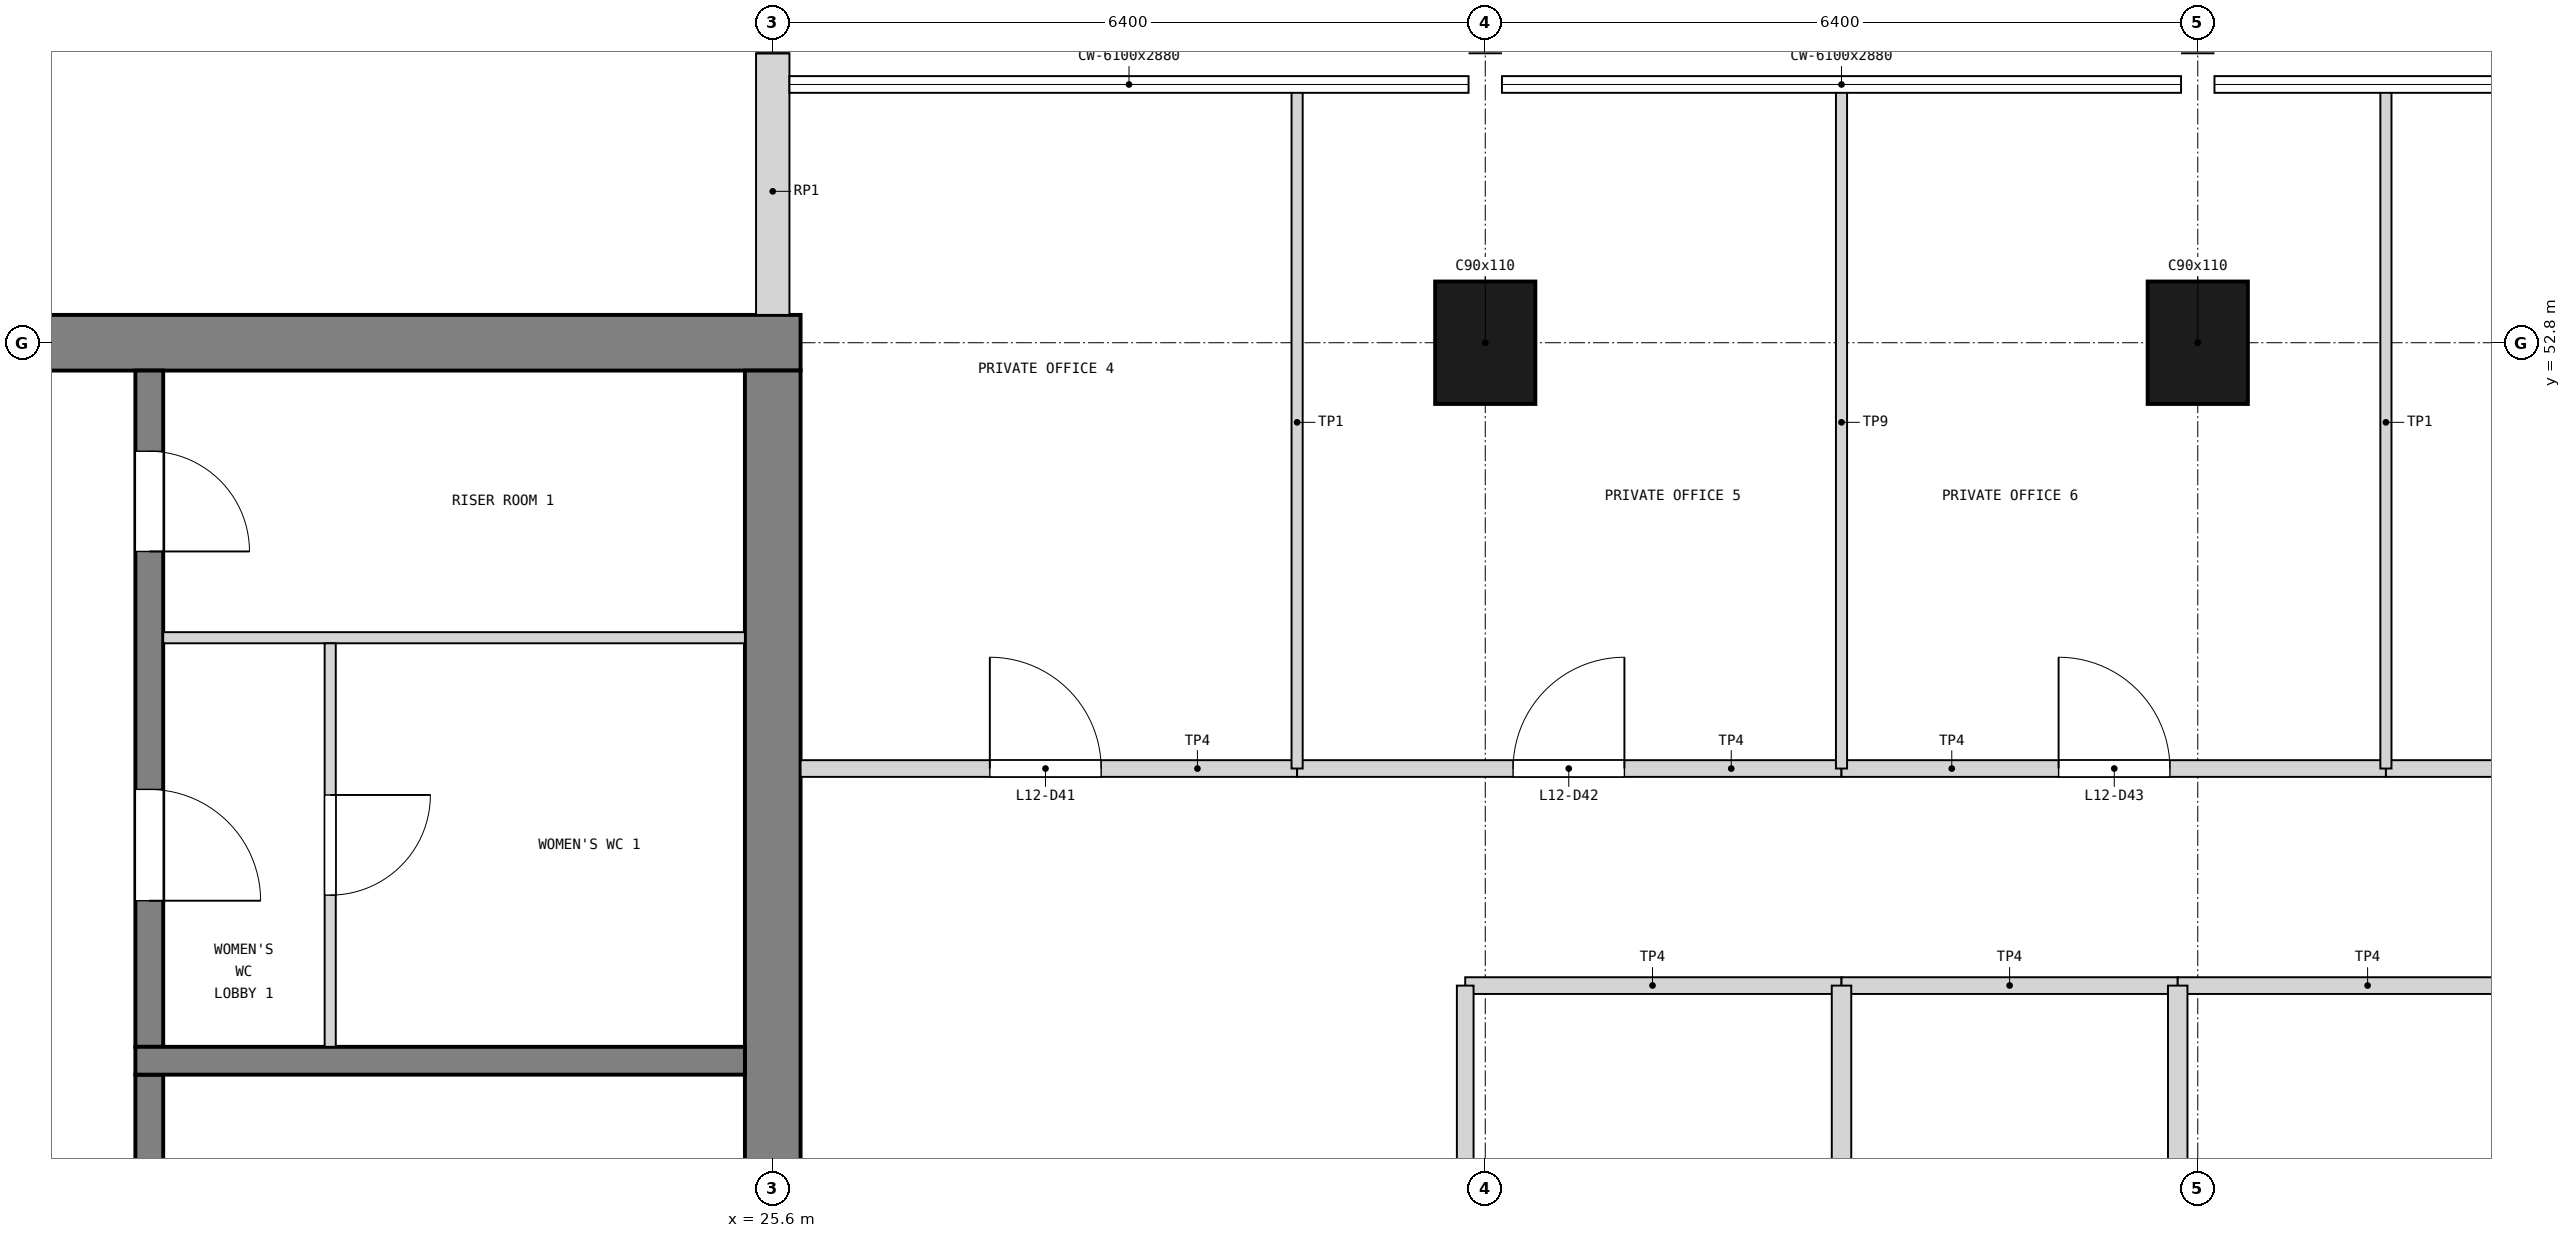
"""IFC4 building model, lengths in metres.
Left out: names, types, materials, properties, quantities, classifications, styles, units other than length and angle.
Written with IfcOpenShell. Run it as: python <this file> out.ifc"""

import sys

from ifc_helpers import new_model, si_unit, direction, frame, frame_2d, origin, origin_2d, place, context, subcontext, project, spatial, rectangle, extrude, element, fill, save


model = new_model("IFC4")
c1 = context("Model", 3, precision=1e-05, world=origin(), true_north=direction((0.0, 1.0)))
c2 = subcontext(c1, "Body", "Model", "MODEL_VIEW")
j1 = project(units=[si_unit("LENGTHUNIT", "METRE"), si_unit("PLANEANGLEUNIT", "RADIAN")], contexts=[c1])
p1 = place(None, origin())
s1 = spatial("IfcSite", under=j1, at=p1, CompositionType="ELEMENT")
p2 = place(p1, origin())
s2 = spatial("IfcBuilding", under=s1, at=p2, CompositionType="ELEMENT")
p3 = place(p2, frame((0.0, 0.0, 48.3)))
s3 = spatial("IfcBuildingStorey", under=s2, at=p3, CompositionType="ELEMENT", Elevation=48.3)
p4 = place(p3, frame((12.55, 52.8, 0.0), z_axis=(0.0, 0.0, 1.0), x_axis=(1.0, 0.0, 0.0)))
e1 = element("IfcWall", 1, at=p4, inside=s3, PredefinedType="SHEAR", context=c2, shape_type="SweptSolid", body=[
    extrude(rectangle(XDim=13.3, YDim=0.5, at=frame_2d((6.65, 0.0))), origin(), (0.0, 0.0, 1.0), 3.9),
])
p5 = place(p4, frame((1.85, 0.0, 1.0)))
e2 = element("IfcOpeningElement", 2, at=p5, cuts=e1, PredefinedType="OPENING", context=c2, shape_type="SweptSolid", body=[
    extrude(rectangle(XDim=0.4, YDim=2.0, at=frame_2d((0.2, 1.0))), frame((0.0, 0.26, 0.0), z_axis=(0.0, -1.0, 0.0), x_axis=(1.0, 0.0, 0.0)), (0.0, 0.0, 1.0), 0.52),
])
p6 = place(p3, frame((25.6, 33.85, 0.0), z_axis=(0.0, 0.0, 1.0), x_axis=(0.0, 1.0, 0.0)))
e3 = element("IfcWall", 3, at=p6, inside=s3, PredefinedType="SHEAR", context=c2, shape_type="SweptSolid", body=[
    extrude(rectangle(XDim=18.7, YDim=0.5, at=frame_2d((9.35, 0.0))), origin(), (0.0, 0.0, 1.0), 3.9),
])
p7 = place(p6, frame((8.35, 0.0, 0.0)))
e4 = element("IfcOpeningElement", 4, at=p7, cuts=e3, PredefinedType="OPENING", context=c2, shape_type="SweptSolid", body=[
    extrude(rectangle(XDim=2.0, YDim=2.1, at=frame_2d((1.0, 1.05))), frame((0.0, 0.26, 0.0), z_axis=(0.0, -1.0, 0.0), x_axis=(1.0, 0.0, 0.0)), (0.0, 0.0, 1.0), 0.52),
])
for number, where, z_axis, x_axis in (
    (5, (32.0, 52.8, 0.0), (0.0, 0.0, 1.0), (1.0, 0.0, 0.0)),
    (6, (38.4, 52.8, 0.0), (0.0, 0.0, 1.0), (1.0, 0.0, 0.0)),
):
    element("IfcColumn", number, at=place(p3, frame(where, z_axis=z_axis, x_axis=x_axis)), inside=s3, PredefinedType="COLUMN", context=c2, shape_type="SweptSolid", body=[
        extrude(rectangle(XDim=0.9, YDim=1.1, at=origin_2d()), origin(), (0.0, 0.0, 1.0), 3.9),
    ])
p8 = place(p3, frame((25.6, 53.05, 0.0), z_axis=(0.0, 0.0, 1.0), x_axis=(0.0, 1.0, 0.0)))
e7 = element("IfcWall", 7, at=p8, inside=s3, PredefinedType="SOLIDWALL", context=c2, shape_type="SweptSolid", body=[
    extrude(rectangle(XDim=2.35, YDim=0.3, at=frame_2d((1.175, 0.0))), origin(), (0.0, 0.0, 1.0), 2.88),
])
p9 = place(p3, frame((20.0, 40.175, 0.0), z_axis=(0.0, 0.0, 1.0), x_axis=(0.0, 1.0, 0.0)))
e8 = element("IfcWall", 8, at=p9, inside=s3, PredefinedType="SOLIDWALL", context=c2, shape_type="SweptSolid", body=[
    extrude(rectangle(XDim=6.05, YDim=0.25, at=frame_2d((3.025, 0.0))), origin(), (0.0, 0.0, 1.0), 3.6),
])
p10 = place(p9, frame((2.025, 0.0, 0.0)))
e9 = element("IfcOpeningElement", 9, at=p10, cuts=e8, PredefinedType="OPENING", context=c2, shape_type="SweptSolid", body=[
    extrude(rectangle(XDim=2.0, YDim=2.1, at=frame_2d((1.0, 1.05))), frame((0.0, 0.135, 0.0), z_axis=(0.0, -1.0, 0.0), x_axis=(1.0, 0.0, 0.0)), (0.0, 0.0, 1.0), 0.27),
])
p11 = place(p3, frame((20.0, 46.475, 0.0), z_axis=(0.0, 0.0, 1.0), x_axis=(0.0, 1.0, 0.0)))
e10 = element("IfcWall", 10, at=p11, inside=s3, PredefinedType="SOLIDWALL", context=c2, shape_type="SweptSolid", body=[
    extrude(rectangle(XDim=6.075, YDim=0.25, at=frame_2d((3.038, 0.0))), origin(), (0.0, 0.0, 1.0), 3.6),
])
p12 = place(p11, frame((1.312, 0.0, 0.0)))
e11 = element("IfcOpeningElement", 11, at=p12, cuts=e10, PredefinedType="OPENING", context=c2, shape_type="SweptSolid", body=[
    extrude(rectangle(XDim=1.0, YDim=2.1, at=frame_2d((0.5, 1.05))), frame((0.0, 0.135, 0.0), z_axis=(0.0, -1.0, 0.0), x_axis=(1.0, 0.0, 0.0)), (0.0, 0.0, 1.0), 0.27),
])
p13 = place(p11, frame((4.45, 0.0, 0.0)))
e12 = element("IfcOpeningElement", 12, at=p13, cuts=e10, PredefinedType="OPENING", context=c2, shape_type="SweptSolid", body=[
    extrude(rectangle(XDim=0.9, YDim=2.1, at=frame_2d((0.45, 1.05))), frame((0.0, 0.135, 0.0), z_axis=(0.0, -1.0, 0.0), x_axis=(1.0, 0.0, 0.0)), (0.0, 0.0, 1.0), 0.27),
])
p14 = place(p3, frame((19.875, 46.35, 0.0), z_axis=(0.0, 0.0, 1.0), x_axis=(1.0, 0.0, 0.0)))
e13 = element("IfcWall", 13, at=p14, inside=s3, PredefinedType="SOLIDWALL", context=c2, shape_type="SweptSolid", body=[
    extrude(rectangle(XDim=5.475, YDim=0.25, at=frame_2d((2.738, 0.0))), origin(), (0.0, 0.0, 1.0), 3.6),
])
p15 = place(p3, frame((20.125, 50.15, 0.0), z_axis=(0.0, 0.0, 1.0), x_axis=(1.0, 0.0, 0.0)))
e14 = element("IfcWall", 14, at=p15, inside=s3, PredefinedType="PARTITIONING", context=c2, shape_type="SweptSolid", body=[
    extrude(rectangle(XDim=5.225, YDim=0.1, at=frame_2d((2.613, 0.0))), origin(), (0.0, 0.0, 1.0), 3.6),
])
p16 = place(p3, frame((21.625, 46.475, 0.0), z_axis=(0.0, 0.0, 1.0), x_axis=(0.0, 1.0, 0.0)))
e15 = element("IfcWall", 15, at=p16, inside=s3, PredefinedType="PARTITIONING", context=c2, shape_type="SweptSolid", body=[
    extrude(rectangle(XDim=3.625, YDim=0.1, at=frame_2d((1.812, 0.0))), origin(), (0.0, 0.0, 1.0), 3.6),
])
p17 = place(p16, frame((1.363, 0.0, 0.0)))
e16 = element("IfcOpeningElement", 16, at=p17, cuts=e15, PredefinedType="OPENING", context=c2, shape_type="SweptSolid", body=[
    extrude(rectangle(XDim=0.9, YDim=2.1, at=frame_2d((0.45, 1.05))), frame((0.0, 0.06, 0.0), z_axis=(0.0, -1.0, 0.0), x_axis=(1.0, 0.0, 0.0)), (0.0, 0.0, 1.0), 0.12),
])
p18 = place(p3, frame((31.82, 47.025, 0.0), z_axis=(0.0, 0.0, 1.0), x_axis=(1.0, 0.0, 0.0)))
e17 = element("IfcWall", 17, at=p18, inside=s3, PredefinedType="PARTITIONING", context=c2, shape_type="SweptSolid", body=[
    extrude(rectangle(XDim=3.38, YDim=0.15, at=frame_2d((1.69, 0.0))), origin(), (0.0, 0.0, 1.0), 3.68),
])
p19 = place(p3, frame((35.2, 47.025, 0.0), z_axis=(0.0, 0.0, 1.0), x_axis=(1.0, 0.0, 0.0)))
e18 = element("IfcWall", 18, at=p19, inside=s3, PredefinedType="PARTITIONING", context=c2, shape_type="SweptSolid", body=[
    extrude(rectangle(XDim=3.02, YDim=0.15, at=frame_2d((1.51, 0.0))), origin(), (0.0, 0.0, 1.0), 3.68),
])
p20 = place(p3, frame((38.22, 47.025, 0.0), z_axis=(0.0, 0.0, 1.0), x_axis=(1.0, 0.0, 0.0)))
e19 = element("IfcWall", 19, at=p20, inside=s3, PredefinedType="PARTITIONING", context=c2, shape_type="SweptSolid", body=[
    extrude(rectangle(XDim=3.38, YDim=0.15, at=frame_2d((1.69, 0.0))), origin(), (0.0, 0.0, 1.0), 3.68),
])
p21 = place(p3, frame((35.2, 39.375, 0.0), z_axis=(0.0, 0.0, 1.0), x_axis=(0.0, 1.0, 0.0)))
e20 = element("IfcWall", 20, at=p21, inside=s3, PredefinedType="PARTITIONING", context=c2, shape_type="SweptSolid", body=[
    extrude(rectangle(XDim=7.65, YDim=0.175, at=frame_2d((3.825, 0.0))), origin(), (0.0, 0.0, 1.0), 3.08),
])
p22 = place(p3, frame((38.22, 43.592, 0.0), z_axis=(0.0, 0.0, 1.0), x_axis=(0.0, 1.0, 0.0)))
e21 = element("IfcWall", 21, at=p22, inside=s3, PredefinedType="PARTITIONING", context=c2, shape_type="SweptSolid", body=[
    extrude(rectangle(XDim=3.433, YDim=0.175, at=frame_2d((1.716, 0.0))), origin(), (0.0, 0.0, 1.0), 2.78),
])
p23 = place(p3, frame((25.85, 48.975, 0.0), z_axis=(0.0, 0.0, 1.0), x_axis=(1.0, 0.0, 0.0)))
e22 = element("IfcWall", 22, at=p23, inside=s3, PredefinedType="PARTITIONING", context=c2, shape_type="SweptSolid", body=[
    extrude(rectangle(XDim=4.46, YDim=0.15, at=frame_2d((2.23, 0.0))), origin(), (0.0, 0.0, 1.0), 3.68),
])
p24 = place(p23, frame((1.7, 0.0, 0.0)))
e23 = element("IfcOpeningElement", 23, at=p24, cuts=e22, PredefinedType="OPENING", context=c2, shape_type="SweptSolid", body=[
    extrude(rectangle(XDim=1.0, YDim=2.1, at=frame_2d((0.5, 1.05))), frame((0.0, 0.085, 0.0), z_axis=(0.0, -1.0, 0.0), x_axis=(1.0, 0.0, 0.0)), (0.0, 0.0, 1.0), 0.17),
])
p25 = place(p3, frame((30.31, 48.975, 0.0), z_axis=(0.0, 0.0, 1.0), x_axis=(1.0, 0.0, 0.0)))
e24 = element("IfcWall", 24, at=p25, inside=s3, PredefinedType="PARTITIONING", context=c2, shape_type="SweptSolid", body=[
    extrude(rectangle(XDim=4.89, YDim=0.15, at=frame_2d((2.445, 0.0))), origin(), (0.0, 0.0, 1.0), 3.68),
])
p26 = place(p25, frame((1.94, 0.0, 0.0)))
e25 = element("IfcOpeningElement", 25, at=p26, cuts=e24, PredefinedType="OPENING", context=c2, shape_type="SweptSolid", body=[
    extrude(rectangle(XDim=1.0, YDim=2.1, at=frame_2d((0.5, 1.05))), frame((0.0, 0.085, 0.0), z_axis=(0.0, -1.0, 0.0), x_axis=(1.0, 0.0, 0.0)), (0.0, 0.0, 1.0), 0.17),
])
p27 = place(p3, frame((35.2, 48.975, 0.0), z_axis=(0.0, 0.0, 1.0), x_axis=(1.0, 0.0, 0.0)))
e26 = element("IfcWall", 26, at=p27, inside=s3, PredefinedType="PARTITIONING", context=c2, shape_type="SweptSolid", body=[
    extrude(rectangle(XDim=4.89, YDim=0.15, at=frame_2d((2.445, 0.0))), origin(), (0.0, 0.0, 1.0), 3.68),
])
p28 = place(p27, frame((1.95, 0.0, 0.0)))
e27 = element("IfcOpeningElement", 27, at=p28, cuts=e26, PredefinedType="OPENING", context=c2, shape_type="SweptSolid", body=[
    extrude(rectangle(XDim=1.0, YDim=2.1, at=frame_2d((0.5, 1.05))), frame((0.0, 0.085, 0.0), z_axis=(0.0, -1.0, 0.0), x_axis=(1.0, 0.0, 0.0)), (0.0, 0.0, 1.0), 0.17),
])
p29 = place(p3, frame((40.09, 48.975, 0.0), z_axis=(0.0, 0.0, 1.0), x_axis=(1.0, 0.0, 0.0)))
e28 = element("IfcWall", 28, at=p29, inside=s3, PredefinedType="PARTITIONING", context=c2, shape_type="SweptSolid", body=[
    extrude(rectangle(XDim=4.53, YDim=0.15, at=frame_2d((2.265, 0.0))), origin(), (0.0, 0.0, 1.0), 3.68),
])
p30 = place(p29, frame((1.76, 0.0, 0.0)))
e29 = element("IfcOpeningElement", 29, at=p30, cuts=e28, PredefinedType="OPENING", context=c2, shape_type="SweptSolid", body=[
    extrude(rectangle(XDim=1.0, YDim=2.1, at=frame_2d((0.5, 1.05))), frame((0.0, 0.085, 0.0), z_axis=(0.0, -1.0, 0.0), x_axis=(1.0, 0.0, 0.0)), (0.0, 0.0, 1.0), 0.17),
])
p31 = place(p3, frame((30.31, 48.975, 0.0), z_axis=(0.0, 0.0, 1.0), x_axis=(0.0, 1.0, 0.0)))
e30 = element("IfcWall", 30, at=p31, inside=s3, PredefinedType="PARTITIONING", context=c2, shape_type="SweptSolid", body=[
    extrude(rectangle(XDim=6.125, YDim=0.1, at=frame_2d((3.062, 0.0))), origin(), (0.0, 0.0, 1.0), 3.68),
])
p32 = place(p3, frame((35.2, 48.975, 0.0), z_axis=(0.0, 0.0, 1.0), x_axis=(0.0, 1.0, 0.0)))
e31 = element("IfcWall", 31, at=p32, inside=s3, PredefinedType="PARTITIONING", context=c2, shape_type="SweptSolid", body=[
    extrude(rectangle(XDim=6.125, YDim=0.1, at=frame_2d((3.062, 0.0))), origin(), (0.0, 0.0, 1.0), 3.08),
])
p33 = place(p3, frame((40.09, 48.975, 0.0), z_axis=(0.0, 0.0, 1.0), x_axis=(0.0, 1.0, 0.0)))
e32 = element("IfcWall", 32, at=p33, inside=s3, PredefinedType="PARTITIONING", context=c2, shape_type="SweptSolid", body=[
    extrude(rectangle(XDim=6.125, YDim=0.1, at=frame_2d((3.062, 0.0))), origin(), (0.0, 0.0, 1.0), 3.68),
])
p34 = place(p3, frame((31.82, 43.592, 0.0), z_axis=(0.0, 0.0, 1.0), x_axis=(0.0, 1.0, 0.0)))
e33 = element("IfcWall", 33, at=p34, inside=s3, PredefinedType="PARTITIONING", context=c2, shape_type="SweptSolid", body=[
    extrude(rectangle(XDim=3.433, YDim=0.15, at=frame_2d((1.716, 0.0))), origin(), (0.0, 0.0, 1.0), 2.78),
])
p35 = place(p12, frame((1.0, 0.0, 0.0), z_axis=(0.0, 0.0, 1.0), x_axis=(-1.0, 0.0, 0.0)))
e34 = element("IfcDoor", 34, at=p35, inside=s3, OperationType="SINGLE_SWING_RIGHT", PredefinedType="DOOR", context=c2, shape_type="SweptSolid", body=[
    extrude(rectangle(XDim=1.0, YDim=2.1, at=frame_2d((0.5, 1.05))), frame((0.0, 0.025, 0.0), z_axis=(0.0, -1.0, 0.0), x_axis=(1.0, 0.0, 0.0)), (0.0, 0.0, 1.0), 0.05),
])
fill(e11, e34)
p36 = place(p17, frame((0.9, 0.0, 0.0), z_axis=(0.0, 0.0, 1.0), x_axis=(-1.0, 0.0, 0.0)))
e35 = element("IfcDoor", 35, at=p36, inside=s3, OperationType="SINGLE_SWING_LEFT", PredefinedType="DOOR", context=c2, shape_type="SweptSolid", body=[
    extrude(rectangle(XDim=0.9, YDim=2.1, at=frame_2d((0.45, 1.05))), frame((0.0, 0.025, 0.0), z_axis=(0.0, -1.0, 0.0), x_axis=(1.0, 0.0, 0.0)), (0.0, 0.0, 1.0), 0.05),
])
fill(e16, e35)
p37 = place(p13, frame((0.9, 0.0, 0.0), z_axis=(0.0, 0.0, 1.0), x_axis=(-1.0, 0.0, 0.0)))
e36 = element("IfcDoor", 36, at=p37, inside=s3, OperationType="SINGLE_SWING_RIGHT", PredefinedType="DOOR", context=c2, shape_type="SweptSolid", body=[
    extrude(rectangle(XDim=0.9, YDim=2.1, at=frame_2d((0.45, 1.05))), frame((0.0, 0.025, 0.0), z_axis=(0.0, -1.0, 0.0), x_axis=(1.0, 0.0, 0.0)), (0.0, 0.0, 1.0), 0.05),
])
fill(e12, e36)
p38 = place(p24, origin())
e37 = element("IfcDoor", 37, at=p38, inside=s3, OperationType="SINGLE_SWING_LEFT", PredefinedType="DOOR", context=c2, shape_type="SweptSolid", body=[
    extrude(rectangle(XDim=1.0, YDim=2.1, at=frame_2d((0.5, 1.05))), frame((0.0, 0.025, 0.0), z_axis=(0.0, -1.0, 0.0), x_axis=(1.0, 0.0, 0.0)), (0.0, 0.0, 1.0), 0.05),
])
fill(e23, e37)
p39 = place(p26, origin())
e38 = element("IfcDoor", 38, at=p39, inside=s3, OperationType="SINGLE_SWING_RIGHT", PredefinedType="DOOR", context=c2, shape_type="SweptSolid", body=[
    extrude(rectangle(XDim=1.0, YDim=2.1, at=frame_2d((0.5, 1.05))), frame((0.0, 0.025, 0.0), z_axis=(0.0, -1.0, 0.0), x_axis=(1.0, 0.0, 0.0)), (0.0, 0.0, 1.0), 0.05),
])
fill(e25, e38)
p40 = place(p28, origin())
e39 = element("IfcDoor", 39, at=p40, inside=s3, OperationType="SINGLE_SWING_LEFT", PredefinedType="DOOR", context=c2, shape_type="SweptSolid", body=[
    extrude(rectangle(XDim=1.0, YDim=2.1, at=frame_2d((0.5, 1.05))), frame((0.0, 0.025, 0.0), z_axis=(0.0, -1.0, 0.0), x_axis=(1.0, 0.0, 0.0)), (0.0, 0.0, 1.0), 0.05),
])
fill(e27, e39)
save(model, sys.argv[1])
